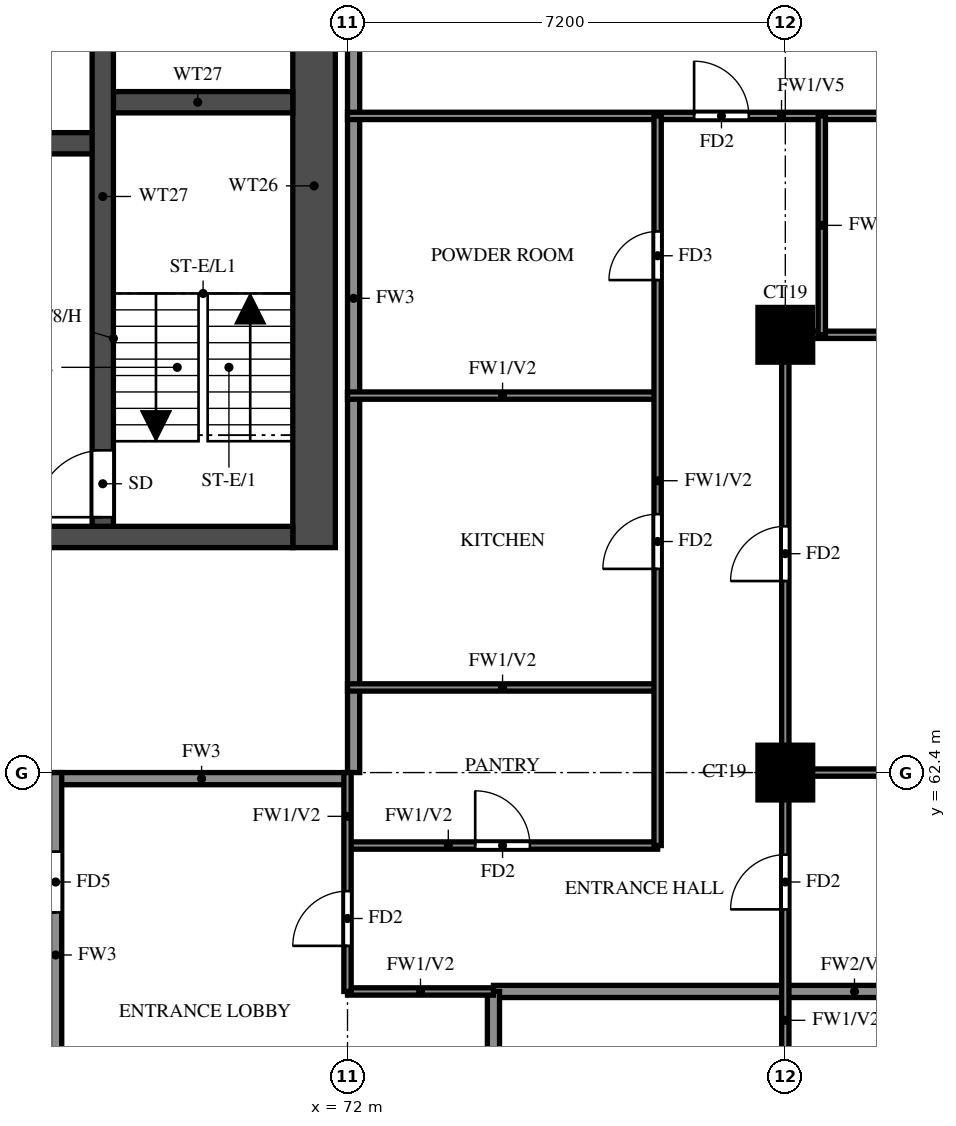
"""IFC4 building model, lengths in metres.
Left out: names, types, materials, properties, quantities, classifications, styles, units other than length and angle.
Written with IfcOpenShell. Run it as: python <this file> out.ifc"""

import sys

from ifc_helpers import new_model, si_unit, direction, frame, frame_2d, origin, origin_2d, place, context, subcontext, project, spatial, rectangle, extrude, source, transform, mapped, element, fill, save


model = new_model("IFC4")
c1 = context("Model", 3, precision=1e-05, world=origin(), true_north=direction((0.0, 1.0)))
c2 = subcontext(c1, "Body", "Model", "MODEL_VIEW")
j1 = project(units=[si_unit("LENGTHUNIT", "METRE"), si_unit("PLANEANGLEUNIT", "RADIAN")], contexts=[c1])
p1 = place(None, origin())
s1 = spatial("IfcSite", under=j1, at=p1, CompositionType="ELEMENT")
p2 = place(p1, origin())
s2 = spatial("IfcBuilding", under=s1, at=p2, CompositionType="ELEMENT")
p3 = place(p2, frame((0.0, 0.0, 174.5)))
s3 = spatial("IfcBuildingStorey", under=s2, at=p3, CompositionType="ELEMENT", Elevation=174.5)
m1 = source(origin(), c2, "Body", "SweptSolid", [
    extrude(rectangle(XDim=0.9, YDim=0.9, at=origin_2d()), origin(), (0.0, 0.0, 1.0), 3.2),
])
for number, where, z_axis, x_axis in (
    (1, (79.2, 62.4, 0.0), (0.0, 0.0, 1.0), (1.0, 0.0, 0.0)),
    (2, (79.2, 69.6, 0.0), (0.0, 0.0, 1.0), (1.0, 0.0, 0.0)),
):
    element("IfcColumn", number, at=place(p3, frame(where, z_axis=z_axis, x_axis=x_axis)), inside=s3, PredefinedType="COLUMN", context=c2, shape_type="MappedRepresentation", body=[
        mapped(m1, transform((0.0, 0.0, 0.0))),
    ])
p4 = place(p3, frame((71.45, 66.1, 0.0), z_axis=(0.0, 0.0, 1.0), x_axis=(0.0, 1.0, 0.0)))
e3 = element("IfcWall", 3, at=p4, inside=s3, PredefinedType="SHEAR", context=c2, shape_type="SweptSolid", body=[
    extrude(rectangle(XDim=11.9, YDim=0.7, at=frame_2d((5.95, 0.0))), origin(), (0.0, 0.0, 1.0), 3.2),
])
p5 = place(p3, frame((29.7, 66.275, 0.0), z_axis=(0.0, 0.0, 1.0), x_axis=(1.0, 0.0, 0.0)))
e4 = element("IfcWall", 4, at=p5, inside=s3, PredefinedType="SHEAR", context=c2, shape_type="SweptSolid", body=[
    extrude(rectangle(XDim=41.4, YDim=0.35, at=frame_2d((20.7, 0.0))), origin(), (0.0, 0.0, 1.0), 3.2),
])
p6 = place(p5, frame((0.925, 0.0, 0.0)))
e5 = element("IfcOpeningElement", 5, at=p6, cuts=e4, PredefinedType="OPENING", context=c2, shape_type="SweptSolid", body=[
    extrude(rectangle(XDim=1.1, YDim=2.1, at=frame_2d((0.55, 1.05))), frame((0.0, 0.185, 0.0), z_axis=(0.0, -1.0, 0.0), x_axis=(1.0, 0.0, 0.0)), (0.0, 0.0, 1.0), 0.37),
])
p7 = place(p5, frame((3.712, 0.0, 0.0)))
e6 = element("IfcOpeningElement", 6, at=p7, cuts=e4, PredefinedType="OPENING", context=c2, shape_type="SweptSolid", body=[
    extrude(rectangle(XDim=1.8, YDim=2.1, at=frame_2d((0.9, 1.05))), frame((0.0, 0.185, 0.0), z_axis=(0.0, -1.0, 0.0), x_axis=(1.0, 0.0, 0.0)), (0.0, 0.0, 1.0), 0.37),
])
p8 = place(p3, frame((32.825, 72.75, 0.0), z_axis=(0.0, 0.0, 1.0), x_axis=(1.0, 0.0, 0.0)))
e7 = element("IfcWall", 7, at=p8, inside=s3, PredefinedType="SHEAR", context=c2, shape_type="SweptSolid", body=[
    extrude(rectangle(XDim=35.15, YDim=0.35, at=frame_2d((17.575, 0.0))), origin(), (0.0, 0.0, 1.0), 3.2),
])
p9 = place(p8, frame((19.8, 0.0, 0.0)))
e8 = element("IfcOpeningElement", 8, at=p9, cuts=e7, PredefinedType="OPENING", context=c2, shape_type="SweptSolid", body=[
    extrude(rectangle(XDim=1.1, YDim=2.1, at=frame_2d((0.55, 1.05))), frame((0.0, 0.185, 0.0), z_axis=(0.0, -1.0, 0.0), x_axis=(1.0, 0.0, 0.0)), (0.0, 0.0, 1.0), 0.37),
])
p10 = place(p8, frame((27.7, 0.0, 0.0)))
e9 = element("IfcOpeningElement", 9, at=p10, cuts=e7, PredefinedType="OPENING", context=c2, shape_type="SweptSolid", body=[
    extrude(rectangle(XDim=1.1, YDim=2.1, at=frame_2d((0.55, 1.05))), frame((0.0, 0.185, 0.0), z_axis=(0.0, -1.0, 0.0), x_axis=(1.0, 0.0, 0.0)), (0.0, 0.0, 1.0), 0.37),
])
p11 = place(p8, frame((30.3, 0.0, 0.0)))
e10 = element("IfcOpeningElement", 10, at=p11, cuts=e7, PredefinedType="OPENING", context=c2, shape_type="SweptSolid", body=[
    extrude(rectangle(XDim=1.1, YDim=2.1, at=frame_2d((0.55, 1.05))), frame((0.0, 0.185, 0.0), z_axis=(0.0, -1.0, 0.0), x_axis=(1.0, 0.0, 0.0)), (0.0, 0.0, 1.0), 0.37),
])
p12 = place(p8, frame((3.8, 0.0, 0.0)))
e11 = element("IfcOpeningElement", 11, at=p12, cuts=e7, PredefinedType="OPENING", context=c2, shape_type="SweptSolid", body=[
    extrude(rectangle(XDim=1.1, YDim=2.1, at=frame_2d((0.55, 1.05))), frame((0.0, 0.185, 0.0), z_axis=(0.0, -1.0, 0.0), x_axis=(1.0, 0.0, 0.0)), (0.0, 0.0, 1.0), 0.37),
])
p13 = place(p8, frame((6.55, 0.0, 0.0)))
e12 = element("IfcOpeningElement", 12, at=p13, cuts=e7, PredefinedType="OPENING", context=c2, shape_type="SweptSolid", body=[
    extrude(rectangle(XDim=1.1, YDim=2.1, at=frame_2d((0.55, 1.05))), frame((0.0, 0.185, 0.0), z_axis=(0.0, -1.0, 0.0), x_axis=(1.0, 0.0, 0.0)), (0.0, 0.0, 1.0), 0.37),
])
p14 = place(p8, frame((9.3, 0.0, 0.0)))
e13 = element("IfcOpeningElement", 13, at=p14, cuts=e7, PredefinedType="OPENING", context=c2, shape_type="SweptSolid", body=[
    extrude(rectangle(XDim=1.1, YDim=2.1, at=frame_2d((0.55, 1.05))), frame((0.0, 0.185, 0.0), z_axis=(0.0, -1.0, 0.0), x_axis=(1.0, 0.0, 0.0)), (0.0, 0.0, 1.0), 0.37),
])
p15 = place(p8, frame((12.05, 0.0, 0.0)))
e14 = element("IfcOpeningElement", 14, at=p15, cuts=e7, PredefinedType="OPENING", context=c2, shape_type="SweptSolid", body=[
    extrude(rectangle(XDim=1.1, YDim=2.1, at=frame_2d((0.55, 1.05))), frame((0.0, 0.185, 0.0), z_axis=(0.0, -1.0, 0.0), x_axis=(1.0, 0.0, 0.0)), (0.0, 0.0, 1.0), 0.37),
])
p16 = place(p8, frame((14.8, 0.0, 0.0)))
e15 = element("IfcOpeningElement", 15, at=p16, cuts=e7, PredefinedType="OPENING", context=c2, shape_type="SweptSolid", body=[
    extrude(rectangle(XDim=1.1, YDim=2.1, at=frame_2d((0.55, 1.05))), frame((0.0, 0.185, 0.0), z_axis=(0.0, -1.0, 0.0), x_axis=(1.0, 0.0, 0.0)), (0.0, 0.0, 1.0), 0.37),
])
p17 = place(p8, frame((17.55, 0.0, 0.0)))
e16 = element("IfcOpeningElement", 16, at=p17, cuts=e7, PredefinedType="OPENING", context=c2, shape_type="SweptSolid", body=[
    extrude(rectangle(XDim=1.1, YDim=2.1, at=frame_2d((0.55, 1.05))), frame((0.0, 0.185, 0.0), z_axis=(0.0, -1.0, 0.0), x_axis=(1.0, 0.0, 0.0)), (0.0, 0.0, 1.0), 0.37),
])
p18 = place(p8, frame((0.938, 0.0, 0.0)))
e17 = element("IfcOpeningElement", 17, at=p18, cuts=e7, PredefinedType="OPENING", context=c2, shape_type="SweptSolid", body=[
    extrude(rectangle(XDim=1.1, YDim=2.1, at=frame_2d((0.55, 1.05))), frame((0.0, 0.185, 0.0), z_axis=(0.0, -1.0, 0.0), x_axis=(1.0, 0.0, 0.0)), (0.0, 0.0, 1.0), 0.37),
])
p19 = place(p3, frame((67.975, 73.425, 0.0), z_axis=(0.0, 0.0, 1.0), x_axis=(1.0, 0.0, 0.0)))
e18 = element("IfcWall", 18, at=p19, inside=s3, PredefinedType="SHEAR", context=c2, shape_type="SweptSolid", body=[
    extrude(rectangle(XDim=3.125, YDim=0.35, at=frame_2d((1.562, 0.0))), origin(), (0.0, 0.0, 1.0), 3.2),
])
p20 = place(p3, frame((67.975, 66.45, 0.0), z_axis=(0.0, 0.0, 1.0), x_axis=(0.0, 1.0, 0.0)))
e19 = element("IfcWall", 19, at=p20, inside=s3, PredefinedType="SHEAR", context=c2, shape_type="SweptSolid", body=[
    extrude(rectangle(XDim=10.85, YDim=0.35, at=frame_2d((5.425, 0.0))), origin(), (0.0, 0.0, 1.0), 3.2),
])
p21 = place(p20, frame((0.15, 0.0, 0.0)))
e20 = element("IfcOpeningElement", 20, at=p21, cuts=e19, PredefinedType="OPENING", context=c2, shape_type="SweptSolid", body=[
    extrude(rectangle(XDim=1.1, YDim=2.1, at=frame_2d((0.55, 1.05))), frame((0.0, 0.185, 0.0), z_axis=(0.0, -1.0, 0.0), x_axis=(1.0, 0.0, 0.0)), (0.0, 0.0, 1.0), 0.37),
])
p22 = place(p3, frame((67.2, 62.3, 0.0), z_axis=(0.0, 0.0, 1.0), x_axis=(1.0, 0.0, 0.0)))
e21 = element("IfcWall", 21, at=p22, inside=s3, PredefinedType="SOLIDWALL", context=c2, shape_type="SweptSolid", body=[
    extrude(rectangle(XDim=4.8, YDim=0.2, at=frame_2d((2.4, 0.0))), origin(), (0.0, 0.0, 1.0), 3.2),
])
p23 = place(p3, frame((67.2, 56.4, 0.0), z_axis=(0.0, 0.0, 1.0), x_axis=(0.0, 1.0, 0.0)))
e22 = element("IfcWall", 22, at=p23, inside=s3, PredefinedType="SOLIDWALL", context=c2, shape_type="SweptSolid", body=[
    extrude(rectangle(XDim=6.0, YDim=0.2, at=frame_2d((3.0, 0.0))), origin(), (0.0, 0.0, 1.0), 3.2),
])
p24 = place(p23, frame((3.7, 0.0, 0.0)))
e23 = element("IfcOpeningElement", 23, at=p24, cuts=e22, PredefinedType="OPENING", context=c2, shape_type="SweptSolid", body=[
    extrude(rectangle(XDim=1.0, YDim=2.1, at=frame_2d((0.5, 1.05))), frame((0.0, 0.11, 0.0), z_axis=(0.0, -1.0, 0.0), x_axis=(1.0, 0.0, 0.0)), (0.0, 0.0, 1.0), 0.22),
])
p25 = place(p3, frame((72.1, 62.4, 0.0), z_axis=(0.0, 0.0, 1.0), x_axis=(0.0, 1.0, 0.0)))
e24 = element("IfcWall", 24, at=p25, inside=s3, PredefinedType="SOLIDWALL", context=c2, shape_type="SweptSolid", body=[
    extrude(rectangle(XDim=15.6, YDim=0.2, at=frame_2d((7.8, 0.0))), origin(), (0.0, 0.0, 1.0), 3.2),
])
p26 = place(p3, frame((74.4, 58.8, 0.0), z_axis=(0.0, 0.0, 1.0), x_axis=(1.0, 0.0, 0.0)))
e25 = element("IfcWall", 25, at=p26, inside=s3, PredefinedType="SOLIDWALL", context=c2, shape_type="SweptSolid", body=[
    extrude(rectangle(XDim=11.875, YDim=0.2, at=frame_2d((5.938, 0.0))), origin(), (0.0, 0.0, 1.0), 2.3),
])
p27 = place(p3, frame((74.4, 56.4, 0.0), z_axis=(0.0, 0.0, 1.0), x_axis=(0.0, 1.0, 0.0)))
e26 = element("IfcWall", 26, at=p27, inside=s3, PredefinedType="SOLIDWALL", context=c2, shape_type="SweptSolid", body=[
    extrude(rectangle(XDim=2.4, YDim=0.2, at=frame_2d((1.2, 0.0))), origin(), (0.0, 0.0, 1.0), 3.2),
])
p28 = place(p3, frame((72.0, 58.8, 0.0), z_axis=(0.0, 0.0, 1.0), x_axis=(1.0, 0.0, 0.0)))
e27 = element("IfcWall", 27, at=p28, inside=s3, PredefinedType="PARTITIONING", context=c2, shape_type="SweptSolid", body=[
    extrude(rectangle(XDim=2.4, YDim=0.12, at=frame_2d((1.2, 0.0))), origin(), (0.0, 0.0, 1.0), 3.2),
])
p29 = place(p3, frame((72.0, 61.2, 0.0), z_axis=(0.0, 0.0, 1.0), x_axis=(1.0, 0.0, 0.0)))
e28 = element("IfcWall", 28, at=p29, inside=s3, PredefinedType="PARTITIONING", context=c2, shape_type="SweptSolid", body=[
    extrude(rectangle(XDim=5.1, YDim=0.12, at=frame_2d((2.55, 0.0))), origin(), (0.0, 0.0, 1.0), 3.2),
])
p30 = place(p29, frame((2.1, 0.0, 0.0)))
e29 = element("IfcOpeningElement", 29, at=p30, cuts=e28, PredefinedType="OPENING", context=c2, shape_type="SweptSolid", body=[
    extrude(rectangle(XDim=0.9, YDim=2.1, at=frame_2d((0.45, 1.05))), frame((0.0, 0.07, 0.0), z_axis=(0.0, -1.0, 0.0), x_axis=(1.0, 0.0, 0.0)), (0.0, 0.0, 1.0), 0.14),
])
p31 = place(p3, frame((79.2, 62.4, 0.0), z_axis=(0.0, 0.0, 1.0), x_axis=(1.0, 0.0, 0.0)))
e30 = element("IfcWall", 30, at=p31, inside=s3, PredefinedType="PARTITIONING", context=c2, shape_type="SweptSolid", body=[
    extrude(rectangle(XDim=7.075, YDim=0.12, at=frame_2d((3.538, 0.0))), origin(), (0.0, 0.0, 1.0), 3.2),
])
for number, where, z_axis, x_axis in (
    (31, (72.0, 63.8, 0.0), (0.0, 0.0, 1.0), (1.0, 0.0, 0.0)),
    (32, (72.0, 68.6, 0.0), (0.0, 0.0, 1.0), (1.0, 0.0, 0.0)),
):
    element("IfcWall", number, at=place(p3, frame(where, z_axis=z_axis, x_axis=x_axis)), inside=s3, PredefinedType="PARTITIONING", context=c2, shape_type="SweptSolid", body=[
        extrude(rectangle(XDim=5.1, YDim=0.12, at=frame_2d((2.55, 0.0))), origin(), (0.0, 0.0, 1.0), 3.2),
    ])
p32 = place(p3, frame((79.2, 69.6, 0.0), z_axis=(0.0, 0.0, 1.0), x_axis=(1.0, 0.0, 0.0)))
e33 = element("IfcWall", 33, at=p32, inside=s3, PredefinedType="PARTITIONING", context=c2, shape_type="SweptSolid", body=[
    extrude(rectangle(XDim=7.075, YDim=0.12, at=frame_2d((3.538, 0.0))), origin(), (0.0, 0.0, 1.0), 3.2),
])
p33 = place(p32, frame((3.438, 0.0, 0.0)))
e34 = element("IfcOpeningElement", 34, at=p33, cuts=e33, PredefinedType="OPENING", context=c2, shape_type="SweptSolid", body=[
    extrude(rectangle(XDim=0.8, YDim=2.1, at=frame_2d((0.4, 1.05))), frame((0.0, 0.07, 0.0), z_axis=(0.0, -1.0, 0.0), x_axis=(1.0, 0.0, 0.0)), (0.0, 0.0, 1.0), 0.14),
])
p34 = place(p3, frame((72.0, 73.2, 0.0), z_axis=(0.0, 0.0, 1.0), x_axis=(1.0, 0.0, 0.0)))
e35 = element("IfcWall", 35, at=p34, inside=s3, PredefinedType="PARTITIONING", context=c2, shape_type="SweptSolid", body=[
    extrude(rectangle(XDim=14.275, YDim=0.12, at=frame_2d((7.137, 0.0))), origin(), (0.0, 0.0, 1.0), 2.3),
])
p35 = place(p34, frame((5.7, 0.0, 0.0)))
e36 = element("IfcOpeningElement", 36, at=p35, cuts=e35, PredefinedType="OPENING", context=c2, shape_type="SweptSolid", body=[
    extrude(rectangle(XDim=0.9, YDim=2.1, at=frame_2d((0.45, 1.05))), frame((0.0, 0.07, 0.0), z_axis=(0.0, -1.0, 0.0), x_axis=(1.0, 0.0, 0.0)), (0.0, 0.0, 1.0), 0.14),
])
p36 = place(p3, frame((72.0, 58.8, 0.0), z_axis=(0.0, 0.0, 1.0), x_axis=(0.0, 1.0, 0.0)))
e37 = element("IfcWall", 37, at=p36, inside=s3, PredefinedType="PARTITIONING", context=c2, shape_type="SweptSolid", body=[
    extrude(rectangle(XDim=3.6, YDim=0.12, at=frame_2d((1.8, 0.0))), origin(), (0.0, 0.0, 1.0), 3.2),
])
p37 = place(p36, frame((0.75, 0.0, 0.0)))
e38 = element("IfcOpeningElement", 38, at=p37, cuts=e37, PredefinedType="OPENING", context=c2, shape_type="SweptSolid", body=[
    extrude(rectangle(XDim=0.9, YDim=2.1, at=frame_2d((0.45, 1.05))), frame((0.0, 0.07, 0.0), z_axis=(0.0, -1.0, 0.0), x_axis=(1.0, 0.0, 0.0)), (0.0, 0.0, 1.0), 0.14),
])
p38 = place(p3, frame((77.1, 61.2, 0.0), z_axis=(0.0, 0.0, 1.0), x_axis=(0.0, 1.0, 0.0)))
e39 = element("IfcWall", 39, at=p38, inside=s3, PredefinedType="PARTITIONING", context=c2, shape_type="SweptSolid", body=[
    extrude(rectangle(XDim=12.0, YDim=0.12, at=frame_2d((6.0, 0.0))), origin(), (0.0, 0.0, 1.0), 3.2),
])
p39 = place(p38, frame((4.55, 0.0, 0.0)))
e40 = element("IfcOpeningElement", 40, at=p39, cuts=e39, PredefinedType="OPENING", context=c2, shape_type="SweptSolid", body=[
    extrude(rectangle(XDim=0.9, YDim=2.1, at=frame_2d((0.45, 1.05))), frame((0.0, 0.07, 0.0), z_axis=(0.0, -1.0, 0.0), x_axis=(1.0, 0.0, 0.0)), (0.0, 0.0, 1.0), 0.14),
])
p40 = place(p38, frame((9.3, 0.0, 0.0)))
e41 = element("IfcOpeningElement", 41, at=p40, cuts=e39, PredefinedType="OPENING", context=c2, shape_type="SweptSolid", body=[
    extrude(rectangle(XDim=0.8, YDim=2.1, at=frame_2d((0.4, 1.05))), frame((0.0, 0.07, 0.0), z_axis=(0.0, -1.0, 0.0), x_axis=(1.0, 0.0, 0.0)), (0.0, 0.0, 1.0), 0.14),
])
p41 = place(p3, frame((79.2, 48.125, 0.0), z_axis=(0.0, 0.0, 1.0), x_axis=(0.0, 1.0, 0.0)))
e42 = element("IfcWall", 42, at=p41, inside=s3, PredefinedType="PARTITIONING", context=c2, shape_type="SweptSolid", body=[
    extrude(rectangle(XDim=21.475, YDim=0.12, at=frame_2d((10.738, 0.0))), origin(), (0.0, 0.0, 1.0), 3.2),
])
p42 = place(p41, frame((2.788, 0.0, 0.0)))
e43 = element("IfcOpeningElement", 43, at=p42, cuts=e42, PredefinedType="OPENING", context=c2, shape_type="SweptSolid", body=[
    extrude(rectangle(XDim=1.5, YDim=2.1, at=frame_2d((0.75, 1.05))), frame((0.0, 0.07, 0.0), z_axis=(0.0, -1.0, 0.0), x_axis=(1.0, 0.0, 0.0)), (0.0, 0.0, 1.0), 0.14),
])
p43 = place(p41, frame((8.425, 0.0, 0.0)))
e44 = element("IfcOpeningElement", 44, at=p43, cuts=e42, PredefinedType="OPENING", context=c2, shape_type="SweptSolid", body=[
    extrude(rectangle(XDim=0.9, YDim=2.1, at=frame_2d((0.45, 1.05))), frame((0.0, 0.07, 0.0), z_axis=(0.0, -1.0, 0.0), x_axis=(1.0, 0.0, 0.0)), (0.0, 0.0, 1.0), 0.14),
])
p44 = place(p41, frame((12.025, 0.0, 0.0)))
e45 = element("IfcOpeningElement", 45, at=p44, cuts=e42, PredefinedType="OPENING", context=c2, shape_type="SweptSolid", body=[
    extrude(rectangle(XDim=0.9, YDim=2.1, at=frame_2d((0.45, 1.05))), frame((0.0, 0.07, 0.0), z_axis=(0.0, -1.0, 0.0), x_axis=(1.0, 0.0, 0.0)), (0.0, 0.0, 1.0), 0.14),
])
p45 = place(p41, frame((17.425, 0.0, 0.0)))
e46 = element("IfcOpeningElement", 46, at=p45, cuts=e42, PredefinedType="OPENING", context=c2, shape_type="SweptSolid", body=[
    extrude(rectangle(XDim=0.9, YDim=2.1, at=frame_2d((0.45, 1.05))), frame((0.0, 0.07, 0.0), z_axis=(0.0, -1.0, 0.0), x_axis=(1.0, 0.0, 0.0)), (0.0, 0.0, 1.0), 0.14),
])
p46 = place(p3, frame((79.8, 69.6, 0.0), z_axis=(0.0, 0.0, 1.0), x_axis=(0.0, 1.0, 0.0)))
e47 = element("IfcWall", 47, at=p46, inside=s3, PredefinedType="PARTITIONING", context=c2, shape_type="SweptSolid", body=[
    extrude(rectangle(XDim=3.6, YDim=0.12, at=frame_2d((1.8, 0.0))), origin(), (0.0, 0.0, 1.0), 3.2),
])
p47 = place(p21, origin())
e48 = element("IfcDoor", 48, at=p47, inside=s3, OperationType="SINGLE_SWING_LEFT", PredefinedType="DOOR", context=c2, shape_type="SweptSolid", body=[
    extrude(rectangle(XDim=1.1, YDim=2.1, at=frame_2d((0.55, 1.05))), frame((0.0, 0.025, 0.0), z_axis=(0.0, -1.0, 0.0), x_axis=(1.0, 0.0, 0.0)), (0.0, 0.0, 1.0), 0.05),
])
fill(e20, e48)
p48 = place(p37, origin())
e49 = element("IfcDoor", 49, at=p48, inside=s3, OperationType="SINGLE_SWING_RIGHT", PredefinedType="DOOR", context=c2, shape_type="SweptSolid", body=[
    extrude(rectangle(XDim=0.9, YDim=2.1, at=frame_2d((0.45, 1.05))), frame((0.0, 0.025, 0.0), z_axis=(0.0, -1.0, 0.0), x_axis=(1.0, 0.0, 0.0)), (0.0, 0.0, 1.0), 0.05),
])
fill(e38, e49)
p49 = place(p24, origin())
e50 = element("IfcDoor", 50, at=p49, inside=s3, OperationType="SINGLE_SWING_LEFT", PredefinedType="DOOR", context=c2, shape_type="SweptSolid", body=[
    extrude(rectangle(XDim=1.0, YDim=2.1, at=frame_2d((0.5, 1.05))), frame((0.0, 0.025, 0.0), z_axis=(0.0, -1.0, 0.0), x_axis=(1.0, 0.0, 0.0)), (0.0, 0.0, 1.0), 0.05),
])
fill(e23, e50)
p50 = place(p44, origin())
e51 = element("IfcDoor", 51, at=p50, inside=s3, OperationType="SINGLE_SWING_LEFT", PredefinedType="DOOR", context=c2, shape_type="SweptSolid", body=[
    extrude(rectangle(XDim=0.9, YDim=2.1, at=frame_2d((0.45, 1.05))), frame((0.0, 0.025, 0.0), z_axis=(0.0, -1.0, 0.0), x_axis=(1.0, 0.0, 0.0)), (0.0, 0.0, 1.0), 0.05),
])
fill(e45, e51)
p51 = place(p45, origin())
e52 = element("IfcDoor", 52, at=p51, inside=s3, OperationType="SINGLE_SWING_RIGHT", PredefinedType="DOOR", context=c2, shape_type="SweptSolid", body=[
    extrude(rectangle(XDim=0.9, YDim=2.1, at=frame_2d((0.45, 1.05))), frame((0.0, 0.025, 0.0), z_axis=(0.0, -1.0, 0.0), x_axis=(1.0, 0.0, 0.0)), (0.0, 0.0, 1.0), 0.05),
])
fill(e46, e52)
p52 = place(p35, origin())
e53 = element("IfcDoor", 53, at=p52, inside=s3, OperationType="SINGLE_SWING_LEFT", PredefinedType="DOOR", context=c2, shape_type="SweptSolid", body=[
    extrude(rectangle(XDim=0.9, YDim=2.1, at=frame_2d((0.45, 1.05))), frame((0.0, 0.025, 0.0), z_axis=(0.0, -1.0, 0.0), x_axis=(1.0, 0.0, 0.0)), (0.0, 0.0, 1.0), 0.05),
])
fill(e36, e53)
p53 = place(p30, origin())
e54 = element("IfcDoor", 54, at=p53, inside=s3, OperationType="SINGLE_SWING_RIGHT", PredefinedType="DOOR", context=c2, shape_type="SweptSolid", body=[
    extrude(rectangle(XDim=0.9, YDim=2.1, at=frame_2d((0.45, 1.05))), frame((0.0, 0.025, 0.0), z_axis=(0.0, -1.0, 0.0), x_axis=(1.0, 0.0, 0.0)), (0.0, 0.0, 1.0), 0.05),
])
fill(e29, e54)
p54 = place(p39, origin())
e55 = element("IfcDoor", 55, at=p54, inside=s3, OperationType="SINGLE_SWING_LEFT", PredefinedType="DOOR", context=c2, shape_type="SweptSolid", body=[
    extrude(rectangle(XDim=0.9, YDim=2.1, at=frame_2d((0.45, 1.05))), frame((0.0, 0.025, 0.0), z_axis=(0.0, -1.0, 0.0), x_axis=(1.0, 0.0, 0.0)), (0.0, 0.0, 1.0), 0.05),
])
fill(e40, e55)
p55 = place(p40, origin())
e56 = element("IfcDoor", 56, at=p55, inside=s3, OperationType="SINGLE_SWING_LEFT", PredefinedType="DOOR", context=c2, shape_type="SweptSolid", body=[
    extrude(rectangle(XDim=0.8, YDim=2.1, at=frame_2d((0.4, 1.05))), frame((0.0, 0.025, 0.0), z_axis=(0.0, -1.0, 0.0), x_axis=(1.0, 0.0, 0.0)), (0.0, 0.0, 1.0), 0.05),
])
fill(e41, e56)
save(model, sys.argv[1])
